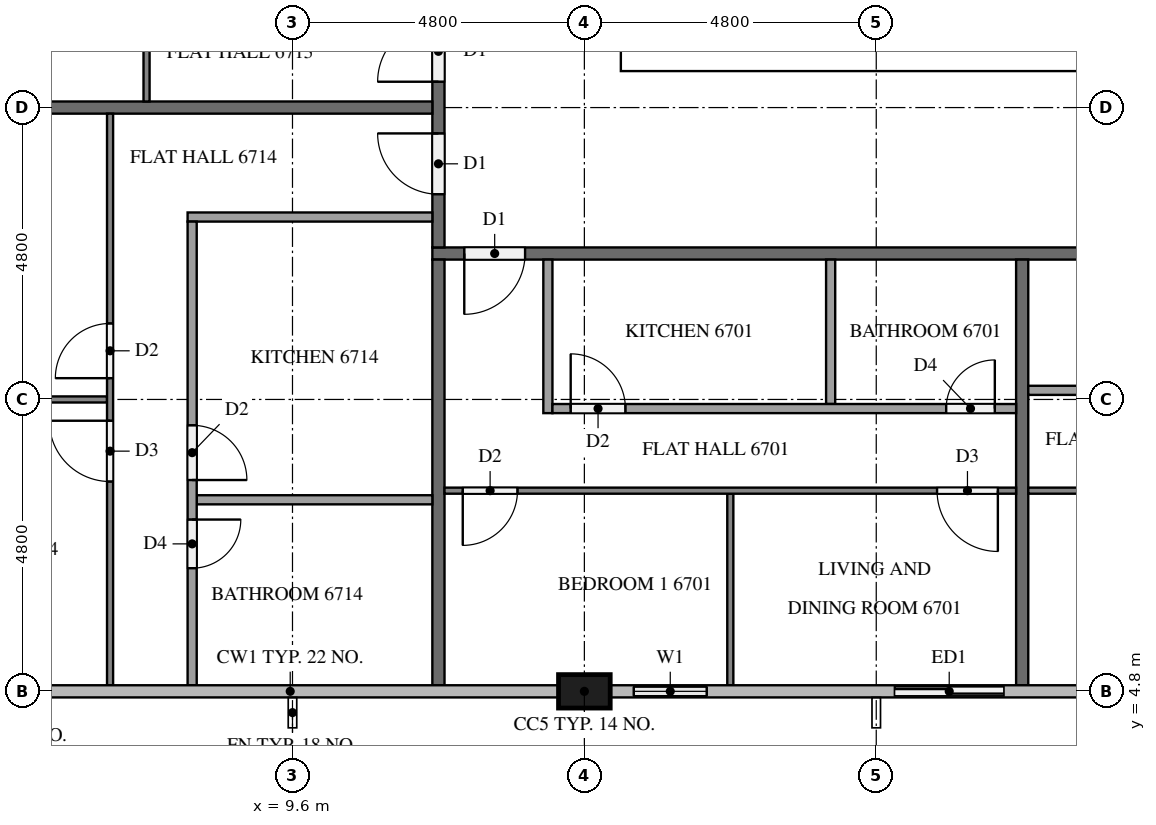
"""IFC4 building model, lengths in metres.
Left out: names, types, materials, properties, quantities, classifications, styles, units other than length and angle.
Written with IfcOpenShell. Run it as: python <this file> out.ifc"""

import sys

from ifc_helpers import new_model, si_unit, direction, frame, frame_2d, origin, origin_2d, place, context, subcontext, project, spatial, rectangle, extrude, element, fill, save


model = new_model("IFC4")
c1 = context("Model", 3, precision=1e-05, world=origin(), true_north=direction((0.0, 1.0)))
c2 = subcontext(c1, "Body", "Model", "MODEL_VIEW")
j1 = project(units=[si_unit("LENGTHUNIT", "METRE"), si_unit("PLANEANGLEUNIT", "RADIAN")], contexts=[c1])
p1 = place(None, origin())
s1 = spatial("IfcSite", under=j1, at=p1, CompositionType="ELEMENT")
p2 = place(p1, origin())
s2 = spatial("IfcBuilding", under=s1, at=p2, CompositionType="ELEMENT")
p3 = place(p2, frame((0.0, 0.0, 256.2)))
s3 = spatial("IfcBuildingStorey", under=s2, at=p3, CompositionType="ELEMENT", Elevation=256.2)
p4 = place(p3, frame((15.0, 15.3, 0.0), z_axis=(0.0, 0.0, 1.0), x_axis=(1.0, 0.0, 0.0)))
e1 = element("IfcWall", 1, at=p4, inside=s3, PredefinedType="SHEAR", context=c2, shape_type="SweptSolid", body=[
    extrude(rectangle(XDim=32.4, YDim=0.6, at=frame_2d((16.2, 0.0))), origin(), (0.0, 0.0, 1.0), 3.2),
])
p5 = place(p4, frame((15.3, 0.0, 0.0)))
e2 = element("IfcOpeningElement", 2, at=p5, cuts=e1, PredefinedType="OPENING", context=c2, shape_type="SweptSolid", body=[
    extrude(rectangle(XDim=1.8, YDim=2.1, at=frame_2d((0.9, 1.05))), frame((0.0, 0.31, 0.0), z_axis=(0.0, -1.0, 0.0), x_axis=(1.0, 0.0, 0.0)), (0.0, 0.0, 1.0), 0.62),
])
p6 = place(p3, frame((14.4, 4.8, 0.0), z_axis=(0.0, 0.0, 1.0), x_axis=(1.0, 0.0, 0.0)))
e3 = element("IfcColumn", 3, at=p6, inside=s3, PredefinedType="COLUMN", context=c2, shape_type="SweptSolid", body=[
    extrude(rectangle(XDim=0.85, YDim=0.55, at=origin_2d()), origin(), (0.0, 0.0, 1.0), 3.2),
])
p7 = place(p3, frame((14.825, 4.8, 0.0), z_axis=(0.0, 0.0, 1.0), x_axis=(1.0, 0.0, 0.0)))
e4 = element("IfcWall", 4, at=p7, inside=s3, PredefinedType="SOLIDWALL", context=c2, shape_type="SweptSolid", body=[
    extrude(rectangle(XDim=1.975, YDim=0.15, at=frame_2d((0.988, 0.0))), origin(), (0.0, 0.0, 1.0), 3.2),
])
p8 = place(p7, frame((0.387, 0.0, 0.9)))
e5 = element("IfcOpeningElement", 5, at=p8, cuts=e4, PredefinedType="OPENING", context=c2, shape_type="SweptSolid", body=[
    extrude(rectangle(XDim=1.2, YDim=1.4, at=frame_2d((0.6, 0.7))), frame((0.0, 0.085, 0.0), z_axis=(0.0, -1.0, 0.0), x_axis=(1.0, 0.0, 0.0)), (0.0, 0.0, 1.0), 0.17),
])
p9 = place(p3, frame((19.2, 4.8, 0.0), z_axis=(0.0, 0.0, 1.0), x_axis=(1.0, 0.0, 0.0)))
e6 = element("IfcWall", 6, at=p9, inside=s3, PredefinedType="SOLIDWALL", context=c2, shape_type="SweptSolid", body=[
    extrude(rectangle(XDim=2.4, YDim=0.15, at=frame_2d((1.2, 0.0))), origin(), (0.0, 0.0, 1.0), 3.2),
])
p10 = place(p9, frame((0.3, 0.0, 0.0)))
e7 = element("IfcOpeningElement", 7, at=p10, cuts=e6, PredefinedType="OPENING", context=c2, shape_type="SweptSolid", body=[
    extrude(rectangle(XDim=1.8, YDim=2.4, at=frame_2d((0.9, 1.2))), frame((0.0, 0.085, 0.0), z_axis=(0.0, -1.0, 0.0), x_axis=(1.0, 0.0, 0.0)), (0.0, 0.0, 1.0), 0.17),
])
p11 = place(p3, frame((50.5, 12.0, 0.0), z_axis=(0.0, 0.0, 1.0), x_axis=(-1.0, 0.0, 0.0)))
e8 = element("IfcWall", 8, at=p11, inside=s3, PredefinedType="PARTITIONING", context=c2, shape_type="SweptSolid", body=[
    extrude(rectangle(XDim=38.6, YDim=0.2, at=frame_2d((19.3, 0.0))), origin(), (0.0, 0.0, 1.0), 3.2),
])
p12 = place(p11, frame((37.075, 0.0, 0.0)))
e9 = element("IfcOpeningElement", 9, at=p12, cuts=e8, PredefinedType="OPENING", context=c2, shape_type="SweptSolid", body=[
    extrude(rectangle(XDim=1.0, YDim=2.1, at=frame_2d((0.5, 1.05))), frame((0.0, 0.11, 0.0), z_axis=(0.0, -1.0, 0.0), x_axis=(1.0, 0.0, 0.0)), (0.0, 0.0, 1.0), 0.22),
])
p13 = place(p11, frame((12.525, 0.0, 0.0)))
e10 = element("IfcOpeningElement", 10, at=p13, cuts=e8, PredefinedType="OPENING", context=c2, shape_type="SweptSolid", body=[
    extrude(rectangle(XDim=1.0, YDim=2.1, at=frame_2d((0.5, 1.05))), frame((0.0, 0.11, 0.0), z_axis=(0.0, -1.0, 0.0), x_axis=(1.0, 0.0, 0.0)), (0.0, 0.0, 1.0), 0.22),
])
p14 = place(p11, frame((10.675, 0.0, 0.0)))
e11 = element("IfcOpeningElement", 11, at=p14, cuts=e8, PredefinedType="OPENING", context=c2, shape_type="SweptSolid", body=[
    extrude(rectangle(XDim=1.0, YDim=2.1, at=frame_2d((0.5, 1.05))), frame((0.0, 0.11, 0.0), z_axis=(0.0, -1.0, 0.0), x_axis=(1.0, 0.0, 0.0)), (0.0, 0.0, 1.0), 0.22),
])
p15 = place(p3, frame((12.0, 12.1, 0.0), z_axis=(0.0, 0.0, 1.0), x_axis=(0.0, 1.0, 0.0)))
e12 = element("IfcWall", 12, at=p15, inside=s3, PredefinedType="PARTITIONING", context=c2, shape_type="SweptSolid", body=[
    extrude(rectangle(XDim=28.6, YDim=0.2, at=frame_2d((14.3, 0.0))), origin(), (0.0, 0.0, 1.0), 3.2),
])
p16 = place(p15, frame((26.725, 0.0, 0.0)))
e13 = element("IfcOpeningElement", 13, at=p16, cuts=e12, PredefinedType="OPENING", context=c2, shape_type="SweptSolid", body=[
    extrude(rectangle(XDim=1.0, YDim=2.1, at=frame_2d((0.5, 1.05))), frame((0.0, 0.11, 0.0), z_axis=(0.0, -1.0, 0.0), x_axis=(1.0, 0.0, 0.0)), (0.0, 0.0, 1.0), 0.22),
])
p17 = place(p15, frame((24.875, 0.0, 0.0)))
e14 = element("IfcOpeningElement", 14, at=p17, cuts=e12, PredefinedType="OPENING", context=c2, shape_type="SweptSolid", body=[
    extrude(rectangle(XDim=1.0, YDim=2.1, at=frame_2d((0.5, 1.05))), frame((0.0, 0.11, 0.0), z_axis=(0.0, -1.0, 0.0), x_axis=(1.0, 0.0, 0.0)), (0.0, 0.0, 1.0), 0.22),
])
p18 = place(p15, frame((17.675, 0.0, 0.0)))
e15 = element("IfcOpeningElement", 15, at=p18, cuts=e12, PredefinedType="OPENING", context=c2, shape_type="SweptSolid", body=[
    extrude(rectangle(XDim=1.0, YDim=2.1, at=frame_2d((0.5, 1.05))), frame((0.0, 0.11, 0.0), z_axis=(0.0, -1.0, 0.0), x_axis=(1.0, 0.0, 0.0)), (0.0, 0.0, 1.0), 0.22),
])
p19 = place(p15, frame((2.725, 0.0, 0.0)))
e16 = element("IfcOpeningElement", 16, at=p19, cuts=e12, PredefinedType="OPENING", context=c2, shape_type="SweptSolid", body=[
    extrude(rectangle(XDim=1.0, YDim=2.1, at=frame_2d((0.5, 1.05))), frame((0.0, 0.11, 0.0), z_axis=(0.0, -1.0, 0.0), x_axis=(1.0, 0.0, 0.0)), (0.0, 0.0, 1.0), 0.22),
])
p20 = place(p15, frame((0.875, 0.0, 0.0)))
e17 = element("IfcOpeningElement", 17, at=p20, cuts=e12, PredefinedType="OPENING", context=c2, shape_type="SweptSolid", body=[
    extrude(rectangle(XDim=1.0, YDim=2.1, at=frame_2d((0.5, 1.05))), frame((0.0, 0.11, 0.0), z_axis=(0.0, -1.0, 0.0), x_axis=(1.0, 0.0, 0.0)), (0.0, 0.0, 1.0), 0.22),
])
for number, where, z_axis, x_axis in (
    (18, (21.6, 11.9, 0.0), (0.0, 0.0, 1.0), (0.0, -1.0, 0.0)),
    (19, (12.0, 4.9, 0.0), (0.0, 0.0, 1.0), (0.0, 1.0, 0.0)),
):
    element("IfcWall", number, at=place(p3, frame(where, z_axis=z_axis, x_axis=x_axis)), inside=s3, PredefinedType="PARTITIONING", context=c2, shape_type="SweptSolid", body=[
        extrude(rectangle(XDim=7.0, YDim=0.2, at=frame_2d((3.5, 0.0))), origin(), (0.0, 0.0, 1.0), 3.2),
    ])
p21 = place(p3, frame((0.1, 14.4, 0.0), z_axis=(0.0, 0.0, 1.0), x_axis=(1.0, 0.0, 0.0)))
e20 = element("IfcWall", 20, at=p21, inside=s3, PredefinedType="PARTITIONING", context=c2, shape_type="SweptSolid", body=[
    extrude(rectangle(XDim=11.8, YDim=0.2, at=frame_2d((5.9, 0.0))), origin(), (0.0, 0.0, 1.0), 3.2),
])
p22 = place(p3, frame((16.8, 8.05, 0.0), z_axis=(0.0, 0.0, 1.0), x_axis=(0.0, -1.0, 0.0)))
e21 = element("IfcWall", 21, at=p22, inside=s3, PredefinedType="PARTITIONING", context=c2, shape_type="SweptSolid", body=[
    extrude(rectangle(XDim=3.15, YDim=0.1, at=frame_2d((1.575, 0.0))), origin(), (0.0, 0.0, 1.0), 3.2),
])
p23 = place(p3, frame((21.5, 8.1, 0.0), z_axis=(0.0, 0.0, 1.0), x_axis=(-1.0, 0.0, 0.0)))
e22 = element("IfcWall", 22, at=p23, inside=s3, PredefinedType="PARTITIONING", context=c2, shape_type="SweptSolid", body=[
    extrude(rectangle(XDim=9.4, YDim=0.1, at=frame_2d((4.7, 0.0))), origin(), (0.0, 0.0, 1.0), 3.2),
])
p24 = place(p23, frame((8.2, 0.0, 0.0)))
e23 = element("IfcOpeningElement", 23, at=p24, cuts=e22, PredefinedType="OPENING", context=c2, shape_type="SweptSolid", body=[
    extrude(rectangle(XDim=0.9, YDim=2.1, at=frame_2d((0.45, 1.05))), frame((0.0, 0.06, 0.0), z_axis=(0.0, -1.0, 0.0), x_axis=(1.0, 0.0, 0.0)), (0.0, 0.0, 1.0), 0.12),
])
p25 = place(p23, frame((0.3, 0.0, 0.0)))
e24 = element("IfcOpeningElement", 24, at=p25, cuts=e22, PredefinedType="OPENING", context=c2, shape_type="SweptSolid", body=[
    extrude(rectangle(XDim=1.0, YDim=2.1, at=frame_2d((0.5, 1.05))), frame((0.0, 0.06, 0.0), z_axis=(0.0, -1.0, 0.0), x_axis=(1.0, 0.0, 0.0)), (0.0, 0.0, 1.0), 0.12),
])
p26 = place(p3, frame((18.45, 11.9, 0.0), z_axis=(0.0, 0.0, 1.0), x_axis=(0.0, -1.0, 0.0)))
e25 = element("IfcWall", 25, at=p26, inside=s3, PredefinedType="PARTITIONING", context=c2, shape_type="SweptSolid", body=[
    extrude(rectangle(XDim=2.375, YDim=0.15, at=frame_2d((1.188, 0.0))), origin(), (0.0, 0.0, 1.0), 3.2),
])
p27 = place(p3, frame((13.8, 11.9, 0.0), z_axis=(0.0, 0.0, 1.0), x_axis=(0.0, -1.0, 0.0)))
e26 = element("IfcWall", 26, at=p27, inside=s3, PredefinedType="PARTITIONING", context=c2, shape_type="SweptSolid", body=[
    extrude(rectangle(XDim=2.525, YDim=0.15, at=frame_2d((1.262, 0.0))), origin(), (0.0, 0.0, 1.0), 3.2),
])
p28 = place(p3, frame((13.875, 9.45, 0.0), z_axis=(0.0, 0.0, 1.0), x_axis=(1.0, 0.0, 0.0)))
e27 = element("IfcWall", 27, at=p28, inside=s3, PredefinedType="PARTITIONING", context=c2, shape_type="SweptSolid", body=[
    extrude(rectangle(XDim=7.625, YDim=0.15, at=frame_2d((3.812, 0.0))), origin(), (0.0, 0.0, 1.0), 3.2),
])
p29 = place(p28, frame((0.3, 0.0, 0.0)))
e28 = element("IfcOpeningElement", 28, at=p29, cuts=e27, PredefinedType="OPENING", context=c2, shape_type="SweptSolid", body=[
    extrude(rectangle(XDim=0.9, YDim=2.1, at=frame_2d((0.45, 1.05))), frame((0.0, 0.085, 0.0), z_axis=(0.0, -1.0, 0.0), x_axis=(1.0, 0.0, 0.0)), (0.0, 0.0, 1.0), 0.17),
])
p30 = place(p28, frame((6.475, 0.0, 0.0)))
e29 = element("IfcOpeningElement", 29, at=p30, cuts=e27, PredefinedType="OPENING", context=c2, shape_type="SweptSolid", body=[
    extrude(rectangle(XDim=0.8, YDim=2.1, at=frame_2d((0.4, 1.05))), frame((0.0, 0.085, 0.0), z_axis=(0.0, -1.0, 0.0), x_axis=(1.0, 0.0, 0.0)), (0.0, 0.0, 1.0), 0.17),
])
p31 = place(p3, frame((38.3, 8.1, 0.0), z_axis=(0.0, 0.0, 1.0), x_axis=(-1.0, 0.0, 0.0)))
e30 = element("IfcWall", 30, at=p31, inside=s3, PredefinedType="PARTITIONING", context=c2, shape_type="SweptSolid", body=[
    extrude(rectangle(XDim=16.6, YDim=0.1, at=frame_2d((8.3, 0.0))), origin(), (0.0, 0.0, 1.0), 3.2),
])
p32 = place(p31, frame((0.3, 0.0, 0.0)))
e31 = element("IfcOpeningElement", 31, at=p32, cuts=e30, PredefinedType="OPENING", context=c2, shape_type="SweptSolid", body=[
    extrude(rectangle(XDim=0.9, YDim=2.1, at=frame_2d((0.45, 1.05))), frame((0.0, 0.06, 0.0), z_axis=(0.0, -1.0, 0.0), x_axis=(1.0, 0.0, 0.0)), (0.0, 0.0, 1.0), 0.12),
])
p33 = place(p31, frame((8.25, 0.0, 0.0)))
e32 = element("IfcOpeningElement", 32, at=p33, cuts=e30, PredefinedType="OPENING", context=c2, shape_type="SweptSolid", body=[
    extrude(rectangle(XDim=0.9, YDim=2.1, at=frame_2d((0.45, 1.05))), frame((0.0, 0.06, 0.0), z_axis=(0.0, -1.0, 0.0), x_axis=(1.0, 0.0, 0.0)), (0.0, 0.0, 1.0), 0.12),
])
p34 = place(p31, frame((9.85, 0.0, 0.0)))
e33 = element("IfcOpeningElement", 33, at=p34, cuts=e30, PredefinedType="OPENING", context=c2, shape_type="SweptSolid", body=[
    extrude(rectangle(XDim=1.0, YDim=2.1, at=frame_2d((0.5, 1.05))), frame((0.0, 0.06, 0.0), z_axis=(0.0, -1.0, 0.0), x_axis=(1.0, 0.0, 0.0)), (0.0, 0.0, 1.0), 0.12),
])
p35 = place(p3, frame((21.7, 9.75, 0.0), z_axis=(0.0, 0.0, 1.0), x_axis=(1.0, 0.0, 0.0)))
e34 = element("IfcWall", 34, at=p35, inside=s3, PredefinedType="PARTITIONING", context=c2, shape_type="SweptSolid", body=[
    extrude(rectangle(XDim=14.825, YDim=0.15, at=frame_2d((7.413, 0.0))), origin(), (0.0, 0.0, 1.0), 3.2),
])
p36 = place(p35, frame((13.725, 0.0, 0.0)))
e35 = element("IfcOpeningElement", 35, at=p36, cuts=e34, PredefinedType="OPENING", context=c2, shape_type="SweptSolid", body=[
    extrude(rectangle(XDim=0.8, YDim=2.1, at=frame_2d((0.4, 1.05))), frame((0.0, 0.085, 0.0), z_axis=(0.0, -1.0, 0.0), x_axis=(1.0, 0.0, 0.0)), (0.0, 0.0, 1.0), 0.17),
])
p37 = place(p35, frame((7.167, 0.0, 0.0)))
e36 = element("IfcOpeningElement", 36, at=p37, cuts=e34, PredefinedType="OPENING", context=c2, shape_type="SweptSolid", body=[
    extrude(rectangle(XDim=0.9, YDim=2.1, at=frame_2d((0.45, 1.05))), frame((0.0, 0.085, 0.0), z_axis=(0.0, -1.0, 0.0), x_axis=(1.0, 0.0, 0.0)), (0.0, 0.0, 1.0), 0.17),
])
p38 = place(p35, frame((5.617, 0.0, 0.0)))
e37 = element("IfcOpeningElement", 37, at=p38, cuts=e34, PredefinedType="OPENING", context=c2, shape_type="SweptSolid", body=[
    extrude(rectangle(XDim=0.9, YDim=2.1, at=frame_2d((0.45, 1.05))), frame((0.0, 0.085, 0.0), z_axis=(0.0, -1.0, 0.0), x_axis=(1.0, 0.0, 0.0)), (0.0, 0.0, 1.0), 0.17),
])
p39 = place(p3, frame((7.2, 14.5, 0.0), z_axis=(0.0, 0.0, 1.0), x_axis=(0.0, 1.0, 0.0)))
e38 = element("IfcWall", 38, at=p39, inside=s3, PredefinedType="PARTITIONING", context=c2, shape_type="SweptSolid", body=[
    extrude(rectangle(XDim=9.4, YDim=0.1, at=frame_2d((4.7, 0.0))), origin(), (0.0, 0.0, 1.0), 3.2),
])
p40 = place(p39, frame((3.45, 0.0, 0.0)))
e39 = element("IfcOpeningElement", 39, at=p40, cuts=e38, PredefinedType="OPENING", context=c2, shape_type="SweptSolid", body=[
    extrude(rectangle(XDim=0.9, YDim=2.1, at=frame_2d((0.45, 1.05))), frame((0.0, 0.06, 0.0), z_axis=(0.0, -1.0, 0.0), x_axis=(1.0, 0.0, 0.0)), (0.0, 0.0, 1.0), 0.12),
])
p41 = place(p39, frame((5.05, 0.0, 0.0)))
e40 = element("IfcOpeningElement", 40, at=p41, cuts=e38, PredefinedType="OPENING", context=c2, shape_type="SweptSolid", body=[
    extrude(rectangle(XDim=1.0, YDim=2.1, at=frame_2d((0.5, 1.05))), frame((0.0, 0.06, 0.0), z_axis=(0.0, -1.0, 0.0), x_axis=(1.0, 0.0, 0.0)), (0.0, 0.0, 1.0), 0.12),
])
p42 = place(p3, frame((6.55, 9.6, 0.0), z_axis=(0.0, 0.0, 1.0), x_axis=(-1.0, 0.0, 0.0)))
e41 = element("IfcWall", 41, at=p42, inside=s3, PredefinedType="PARTITIONING", context=c2, shape_type="SweptSolid", body=[
    extrude(rectangle(XDim=6.2, YDim=0.1, at=frame_2d((3.1, 0.0))), origin(), (0.0, 0.0, 1.0), 3.2),
])
p43 = place(p3, frame((6.6, 4.9, 0.0), z_axis=(0.0, 0.0, 1.0), x_axis=(0.0, 1.0, 0.0)))
e42 = element("IfcWall", 42, at=p43, inside=s3, PredefinedType="PARTITIONING", context=c2, shape_type="SweptSolid", body=[
    extrude(rectangle(XDim=9.4, YDim=0.1, at=frame_2d((4.7, 0.0))), origin(), (0.0, 0.0, 1.0), 3.2),
])
p44 = place(p43, frame((5.05, 0.0, 0.0)))
e43 = element("IfcOpeningElement", 43, at=p44, cuts=e42, PredefinedType="OPENING", context=c2, shape_type="SweptSolid", body=[
    extrude(rectangle(XDim=0.9, YDim=2.1, at=frame_2d((0.45, 1.05))), frame((0.0, 0.06, 0.0), z_axis=(0.0, -1.0, 0.0), x_axis=(1.0, 0.0, 0.0)), (0.0, 0.0, 1.0), 0.12),
])
p45 = place(p43, frame((3.35, 0.0, 0.0)))
e44 = element("IfcOpeningElement", 44, at=p45, cuts=e42, PredefinedType="OPENING", context=c2, shape_type="SweptSolid", body=[
    extrude(rectangle(XDim=1.0, YDim=2.1, at=frame_2d((0.5, 1.05))), frame((0.0, 0.06, 0.0), z_axis=(0.0, -1.0, 0.0), x_axis=(1.0, 0.0, 0.0)), (0.0, 0.0, 1.0), 0.12),
])
p46 = place(p3, frame((11.9, 7.95, 0.0), z_axis=(0.0, 0.0, 1.0), x_axis=(-1.0, 0.0, 0.0)))
e45 = element("IfcWall", 45, at=p46, inside=s3, PredefinedType="PARTITIONING", context=c2, shape_type="SweptSolid", body=[
    extrude(rectangle(XDim=3.875, YDim=0.15, at=frame_2d((1.938, 0.0))), origin(), (0.0, 0.0, 1.0), 3.2),
])
p47 = place(p3, frame((11.9, 12.6, 0.0), z_axis=(0.0, 0.0, 1.0), x_axis=(-1.0, 0.0, 0.0)))
e46 = element("IfcWall", 46, at=p47, inside=s3, PredefinedType="PARTITIONING", context=c2, shape_type="SweptSolid", body=[
    extrude(rectangle(XDim=4.025, YDim=0.15, at=frame_2d((2.012, 0.0))), origin(), (0.0, 0.0, 1.0), 3.2),
])
p48 = place(p3, frame((7.95, 12.525, 0.0), z_axis=(0.0, 0.0, 1.0), x_axis=(0.0, -1.0, 0.0)))
e47 = element("IfcWall", 47, at=p48, inside=s3, PredefinedType="PARTITIONING", context=c2, shape_type="SweptSolid", body=[
    extrude(rectangle(XDim=7.625, YDim=0.15, at=frame_2d((3.812, 0.0))), origin(), (0.0, 0.0, 1.0), 3.2),
])
p49 = place(p48, frame((3.35, 0.0, 0.0)))
e48 = element("IfcOpeningElement", 48, at=p49, cuts=e47, PredefinedType="OPENING", context=c2, shape_type="SweptSolid", body=[
    extrude(rectangle(XDim=0.9, YDim=2.1, at=frame_2d((0.45, 1.05))), frame((0.0, 0.085, 0.0), z_axis=(0.0, -1.0, 0.0), x_axis=(1.0, 0.0, 0.0)), (0.0, 0.0, 1.0), 0.17),
])
p50 = place(p48, frame((4.9, 0.0, 0.0)))
e49 = element("IfcOpeningElement", 49, at=p50, cuts=e47, PredefinedType="OPENING", context=c2, shape_type="SweptSolid", body=[
    extrude(rectangle(XDim=0.8, YDim=2.1, at=frame_2d((0.4, 1.05))), frame((0.0, 0.085, 0.0), z_axis=(0.0, -1.0, 0.0), x_axis=(1.0, 0.0, 0.0)), (0.0, 0.0, 1.0), 0.17),
])
p51 = place(p8, origin())
e50 = element("IfcWindow", 50, at=p51, inside=s3, PartitioningType="SINGLE_PANEL", PredefinedType="WINDOW", context=c2, shape_type="SweptSolid", body=[
    extrude(rectangle(XDim=1.2, YDim=1.4, at=frame_2d((0.6, 0.7))), frame((0.0, 0.03, 0.0), z_axis=(0.0, -1.0, 0.0), x_axis=(1.0, 0.0, 0.0)), (0.0, 0.0, 1.0), 0.06),
])
fill(e5, e50)
p52 = place(p10, origin())
e51 = element("IfcDoor", 51, at=p52, inside=s3, OperationType="SLIDING_TO_LEFT", PredefinedType="DOOR", context=c2, shape_type="SweptSolid", body=[
    extrude(rectangle(XDim=1.8, YDim=2.4, at=frame_2d((0.9, 1.2))), frame((0.0, 0.025, 0.0), z_axis=(0.0, -1.0, 0.0), x_axis=(1.0, 0.0, 0.0)), (0.0, 0.0, 1.0), 0.05),
])
fill(e7, e51)
p53 = place(p12, origin())
e52 = element("IfcDoor", 52, at=p53, inside=s3, OperationType="SINGLE_SWING_RIGHT", PredefinedType="DOOR", context=c2, shape_type="SweptSolid", body=[
    extrude(rectangle(XDim=1.0, YDim=2.1, at=frame_2d((0.5, 1.05))), frame((0.0, 0.025, 0.0), z_axis=(0.0, -1.0, 0.0), x_axis=(1.0, 0.0, 0.0)), (0.0, 0.0, 1.0), 0.05),
])
fill(e9, e52)
p54 = place(p19, origin())
e53 = element("IfcDoor", 53, at=p54, inside=s3, OperationType="SINGLE_SWING_LEFT", PredefinedType="DOOR", context=c2, shape_type="SweptSolid", body=[
    extrude(rectangle(XDim=1.0, YDim=2.1, at=frame_2d((0.5, 1.05))), frame((0.0, 0.025, 0.0), z_axis=(0.0, -1.0, 0.0), x_axis=(1.0, 0.0, 0.0)), (0.0, 0.0, 1.0), 0.05),
])
fill(e16, e53)
p55 = place(p20, origin())
e54 = element("IfcDoor", 54, at=p55, inside=s3, OperationType="SINGLE_SWING_RIGHT", PredefinedType="DOOR", context=c2, shape_type="SweptSolid", body=[
    extrude(rectangle(XDim=1.0, YDim=2.1, at=frame_2d((0.5, 1.05))), frame((0.0, 0.025, 0.0), z_axis=(0.0, -1.0, 0.0), x_axis=(1.0, 0.0, 0.0)), (0.0, 0.0, 1.0), 0.05),
])
fill(e17, e54)
p56 = place(p24, origin())
e55 = element("IfcDoor", 55, at=p56, inside=s3, OperationType="SINGLE_SWING_RIGHT", PredefinedType="DOOR", context=c2, shape_type="SweptSolid", body=[
    extrude(rectangle(XDim=0.9, YDim=2.1, at=frame_2d((0.45, 1.05))), frame((0.0, 0.025, 0.0), z_axis=(0.0, -1.0, 0.0), x_axis=(1.0, 0.0, 0.0)), (0.0, 0.0, 1.0), 0.05),
])
fill(e23, e55)
p57 = place(p25, origin())
e56 = element("IfcDoor", 56, at=p57, inside=s3, OperationType="SINGLE_SWING_LEFT", PredefinedType="DOOR", context=c2, shape_type="SweptSolid", body=[
    extrude(rectangle(XDim=1.0, YDim=2.1, at=frame_2d((0.5, 1.05))), frame((0.0, 0.025, 0.0), z_axis=(0.0, -1.0, 0.0), x_axis=(1.0, 0.0, 0.0)), (0.0, 0.0, 1.0), 0.05),
])
fill(e24, e56)
p58 = place(p29, origin())
e57 = element("IfcDoor", 57, at=p58, inside=s3, OperationType="SINGLE_SWING_LEFT", PredefinedType="DOOR", context=c2, shape_type="SweptSolid", body=[
    extrude(rectangle(XDim=0.9, YDim=2.1, at=frame_2d((0.45, 1.05))), frame((0.0, 0.025, 0.0), z_axis=(0.0, -1.0, 0.0), x_axis=(1.0, 0.0, 0.0)), (0.0, 0.0, 1.0), 0.05),
])
fill(e28, e57)
p59 = place(p30, origin())
e58 = element("IfcDoor", 58, at=p59, inside=s3, OperationType="SINGLE_SWING_RIGHT", PredefinedType="DOOR", context=c2, shape_type="SweptSolid", body=[
    extrude(rectangle(XDim=0.8, YDim=2.1, at=frame_2d((0.4, 1.05))), frame((0.0, 0.025, 0.0), z_axis=(0.0, -1.0, 0.0), x_axis=(1.0, 0.0, 0.0)), (0.0, 0.0, 1.0), 0.05),
])
fill(e29, e58)
p60 = place(p44, origin())
e59 = element("IfcDoor", 59, at=p60, inside=s3, OperationType="SINGLE_SWING_LEFT", PredefinedType="DOOR", context=c2, shape_type="SweptSolid", body=[
    extrude(rectangle(XDim=0.9, YDim=2.1, at=frame_2d((0.45, 1.05))), frame((0.0, 0.025, 0.0), z_axis=(0.0, -1.0, 0.0), x_axis=(1.0, 0.0, 0.0)), (0.0, 0.0, 1.0), 0.05),
])
fill(e43, e59)
p61 = place(p45, origin())
e60 = element("IfcDoor", 60, at=p61, inside=s3, OperationType="SINGLE_SWING_RIGHT", PredefinedType="DOOR", context=c2, shape_type="SweptSolid", body=[
    extrude(rectangle(XDim=1.0, YDim=2.1, at=frame_2d((0.5, 1.05))), frame((0.0, 0.025, 0.0), z_axis=(0.0, -1.0, 0.0), x_axis=(1.0, 0.0, 0.0)), (0.0, 0.0, 1.0), 0.05),
])
fill(e44, e60)
p62 = place(p49, origin())
e61 = element("IfcDoor", 61, at=p62, inside=s3, OperationType="SINGLE_SWING_RIGHT", PredefinedType="DOOR", context=c2, shape_type="SweptSolid", body=[
    extrude(rectangle(XDim=0.9, YDim=2.1, at=frame_2d((0.45, 1.05))), frame((0.0, 0.025, 0.0), z_axis=(0.0, -1.0, 0.0), x_axis=(1.0, 0.0, 0.0)), (0.0, 0.0, 1.0), 0.05),
])
fill(e48, e61)
p63 = place(p50, origin())
e62 = element("IfcDoor", 62, at=p63, inside=s3, OperationType="SINGLE_SWING_LEFT", PredefinedType="DOOR", context=c2, shape_type="SweptSolid", body=[
    extrude(rectangle(XDim=0.8, YDim=2.1, at=frame_2d((0.4, 1.05))), frame((0.0, 0.025, 0.0), z_axis=(0.0, -1.0, 0.0), x_axis=(1.0, 0.0, 0.0)), (0.0, 0.0, 1.0), 0.05),
])
fill(e49, e62)
save(model, sys.argv[1])
